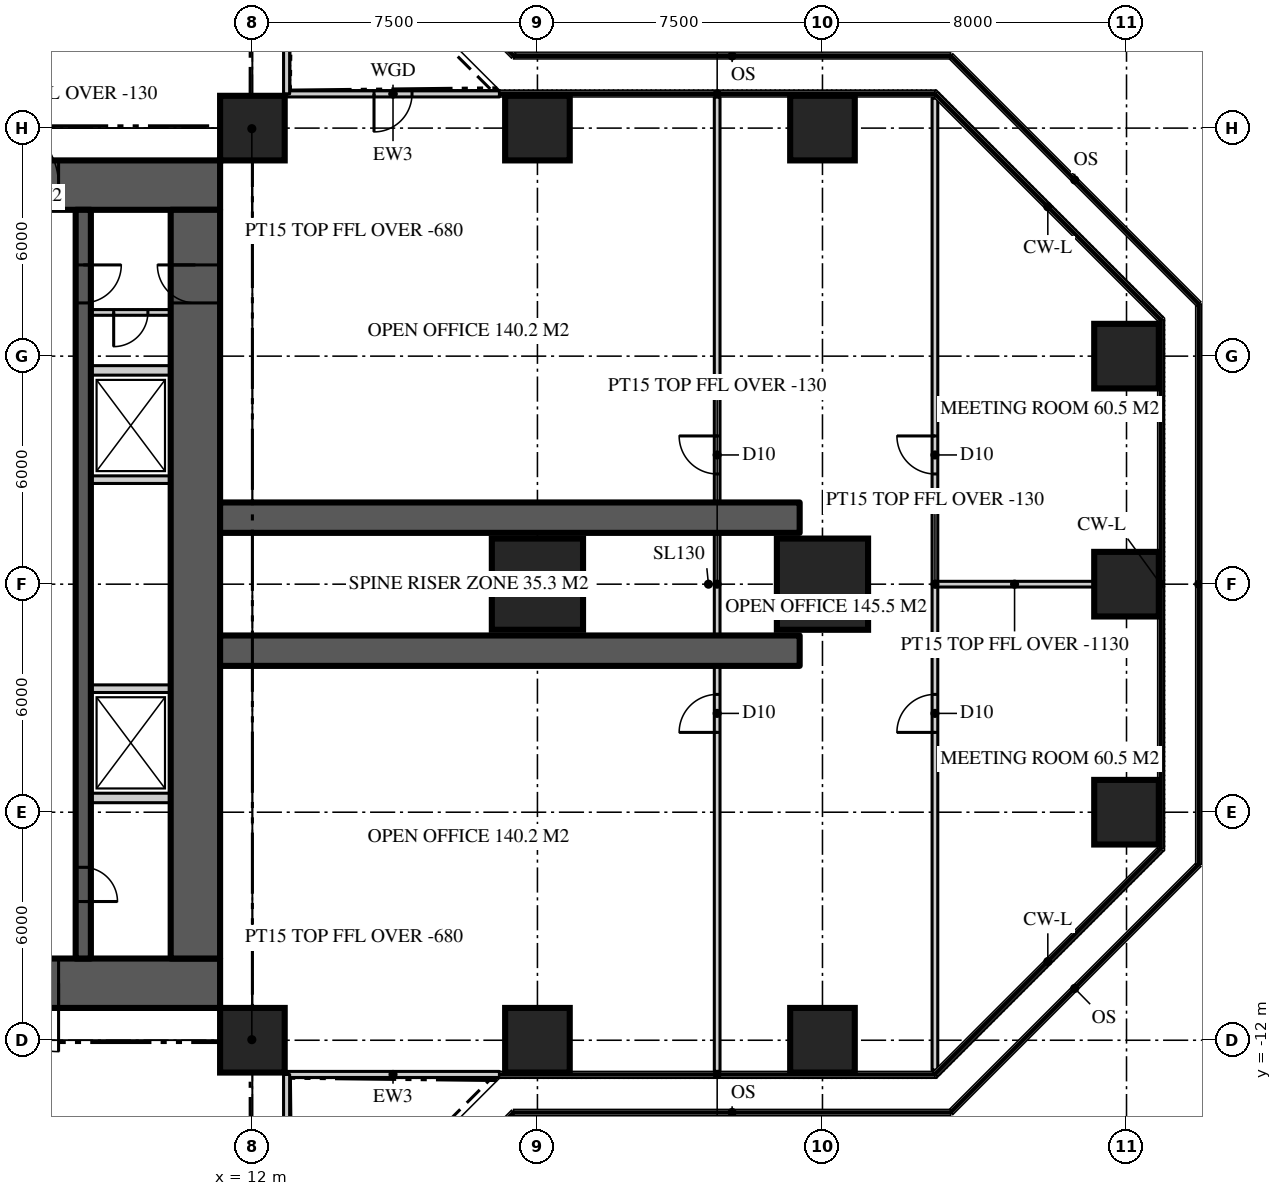
"""IFC4 building model, lengths in metres.
Left out: names, types, materials, properties, quantities, classifications, styles, units other than length and angle.
Written with IfcOpenShell. Run it as: python <this file> out.ifc"""

import sys

from ifc_helpers import new_model, si_unit, direction, frame, frame_2d, origin, origin_2d, place, context, subcontext, project, spatial, rectangle, extrude, element, fill, save


model = new_model("IFC4")
c1 = context("Model", 3, precision=1e-05, world=origin(), true_north=direction((0.0, 1.0)))
c2 = subcontext(c1, "Body", "Model", "MODEL_VIEW")
j1 = project(units=[si_unit("LENGTHUNIT", "METRE"), si_unit("PLANEANGLEUNIT", "RADIAN")], contexts=[c1])
p1 = place(None, origin())
s1 = spatial("IfcSite", under=j1, at=p1, CompositionType="ELEMENT")
p2 = place(p1, origin())
s2 = spatial("IfcBuilding", under=s1, at=p2, CompositionType="ELEMENT")
p3 = place(p2, frame((0.0, 0.0, 66.9)))
s3 = spatial("IfcBuildingStorey", under=s2, at=p3, CompositionType="ELEMENT", Elevation=66.9)
p4 = place(p3, frame((-11.15, 10.5, 0.0), z_axis=(0.0, 0.0, 1.0), x_axis=(1.0, 0.0, 0.0)))
e1 = element("IfcWall", 1, at=p4, inside=s3, PredefinedType="SHEAR", context=c2, shape_type="SweptSolid", body=[
    extrude(rectangle(XDim=22.3, YDim=1.3, at=frame_2d((11.15, 0.0))), origin(), (0.0, 0.0, 1.0), 3.9),
])
p5 = place(p4, frame((4.25, 0.0, 0.0)))
e2 = element("IfcOpeningElement", 2, at=p5, cuts=e1, PredefinedType="OPENING", context=c2, shape_type="SweptSolid", body=[
    extrude(rectangle(XDim=1.8, YDim=2.2, at=frame_2d((0.9, 1.1))), frame((0.0, 0.66, 0.0), z_axis=(0.0, -1.0, 0.0), x_axis=(1.0, 0.0, 0.0)), (0.0, 0.0, 1.0), 1.32),
])
p6 = place(p4, frame((16.25, 0.0, 0.0)))
e3 = element("IfcOpeningElement", 3, at=p6, cuts=e1, PredefinedType="OPENING", context=c2, shape_type="SweptSolid", body=[
    extrude(rectangle(XDim=1.8, YDim=2.2, at=frame_2d((0.9, 1.1))), frame((0.0, 0.66, 0.0), z_axis=(0.0, -1.0, 0.0), x_axis=(1.0, 0.0, 0.0)), (0.0, 0.0, 1.0), 1.32),
])
p7 = place(p3, frame((11.15, -10.5, 0.0), z_axis=(0.0, 0.0, 1.0), x_axis=(-1.0, 0.0, 0.0)))
e4 = element("IfcWall", 4, at=p7, inside=s3, PredefinedType="SHEAR", context=c2, shape_type="SweptSolid", body=[
    extrude(rectangle(XDim=22.3, YDim=1.3, at=frame_2d((11.15, 0.0))), origin(), (0.0, 0.0, 1.0), 3.9),
])
p8 = place(p7, frame((16.25, 0.0, 0.0)))
e5 = element("IfcOpeningElement", 5, at=p8, cuts=e4, PredefinedType="OPENING", context=c2, shape_type="SweptSolid", body=[
    extrude(rectangle(XDim=1.8, YDim=2.2, at=frame_2d((0.9, 1.1))), frame((0.0, 0.66, 0.0), z_axis=(0.0, -1.0, 0.0), x_axis=(1.0, 0.0, 0.0)), (0.0, 0.0, 1.0), 1.32),
])
p9 = place(p7, frame((4.25, 0.0, 0.0)))
e6 = element("IfcOpeningElement", 6, at=p9, cuts=e4, PredefinedType="OPENING", context=c2, shape_type="SweptSolid", body=[
    extrude(rectangle(XDim=1.8, YDim=2.2, at=frame_2d((0.9, 1.1))), frame((0.0, 0.66, 0.0), z_axis=(0.0, -1.0, 0.0), x_axis=(1.0, 0.0, 0.0)), (0.0, 0.0, 1.0), 1.32),
])
p10 = place(p3, frame((10.5, -9.85, 0.0), z_axis=(0.0, 0.0, 1.0), x_axis=(0.0, 1.0, 0.0)))
e7 = element("IfcWall", 7, at=p10, inside=s3, PredefinedType="SHEAR", context=c2, shape_type="SweptSolid", body=[
    extrude(rectangle(XDim=19.7, YDim=1.3, at=frame_2d((9.85, 0.0))), origin(), (0.0, 0.0, 1.0), 3.9),
])
p11 = place(p10, frame((17.25, 0.0, 0.0)))
e8 = element("IfcOpeningElement", 8, at=p11, cuts=e7, PredefinedType="OPENING", context=c2, shape_type="SweptSolid", body=[
    extrude(rectangle(XDim=1.0, YDim=2.2, at=frame_2d((0.5, 1.1))), frame((0.0, 0.66, 0.0), z_axis=(0.0, -1.0, 0.0), x_axis=(1.0, 0.0, 0.0)), (0.0, 0.0, 1.0), 1.32),
])
for number, where, z_axis, x_axis in (
    (9, (11.15, -1.75, 0.0), (0.0, 0.0, 1.0), (1.0, 0.0, 0.0)),
    (10, (11.15, 1.75, 0.0), (0.0, 0.0, 1.0), (1.0, 0.0, 0.0)),
):
    element("IfcWall", number, at=place(p3, frame(where, z_axis=z_axis, x_axis=x_axis)), inside=s3, PredefinedType="SHEAR", context=c2, shape_type="SweptSolid", body=[
        extrude(rectangle(XDim=15.25, YDim=0.8, at=frame_2d((7.625, 0.0))), origin(), (0.0, 0.0, 1.0), 3.9),
    ])
for number, where, z_axis, x_axis in (
    (11, (12.0, -12.0, 0.0), (0.0, 0.0, 1.0), (1.0, 0.0, 0.0)),
    (12, (19.5, -12.0, 0.0), (0.0, 0.0, 1.0), (1.0, 0.0, 0.0)),
    (13, (27.0, -12.0, 0.0), (0.0, 0.0, 1.0), (1.0, 0.0, 0.0)),
    (14, (35.0, -6.0, 0.0), (0.0, 0.0, 1.0), (1.0, 0.0, 0.0)),
):
    element("IfcColumn", number, at=place(p3, frame(where, z_axis=z_axis, x_axis=x_axis)), inside=s3, PredefinedType="COLUMN", context=c2, shape_type="SweptSolid", body=[
        extrude(rectangle(XDim=1.7, YDim=1.7, at=origin_2d()), origin(), (0.0, 0.0, 1.0), 3.9),
    ])
for number, where, z_axis, x_axis in (
    (15, (19.5, 0.0, 0.0), (0.0, 0.0, 1.0), (1.0, 0.0, 0.0)),
    (16, (27.0, 0.0, 0.0), (0.0, 0.0, 1.0), (1.0, 0.0, 0.0)),
):
    element("IfcColumn", number, at=place(p3, frame(where, z_axis=z_axis, x_axis=x_axis)), inside=s3, PredefinedType="COLUMN", context=c2, shape_type="SweptSolid", body=[
        extrude(rectangle(XDim=2.4, YDim=2.4, at=origin_2d()), origin(), (0.0, 0.0, 1.0), 3.9),
    ])
for number, where, z_axis, x_axis in (
    (17, (35.0, 0.0, 0.0), (0.0, 0.0, 1.0), (1.0, 0.0, 0.0)),
    (18, (35.0, 6.0, 0.0), (0.0, 0.0, 1.0), (1.0, 0.0, 0.0)),
    (19, (12.0, 12.0, 0.0), (0.0, 0.0, 1.0), (1.0, 0.0, 0.0)),
    (20, (19.5, 12.0, 0.0), (0.0, 0.0, 1.0), (1.0, 0.0, 0.0)),
    (21, (27.0, 12.0, 0.0), (0.0, 0.0, 1.0), (1.0, 0.0, 0.0)),
):
    element("IfcColumn", number, at=place(p3, frame(where, z_axis=z_axis, x_axis=x_axis)), inside=s3, PredefinedType="COLUMN", context=c2, shape_type="SweptSolid", body=[
        extrude(rectangle(XDim=1.7, YDim=1.7, at=origin_2d()), origin(), (0.0, 0.0, 1.0), 3.9),
    ])
p12 = place(p3, frame((12.9, -12.9, 0.0), z_axis=(0.0, 0.0, 1.0), x_axis=(1.0, 0.0, 0.0)))
e22 = element("IfcWall", 22, at=p12, inside=s3, PredefinedType="SOLIDWALL", context=c2, shape_type="SweptSolid", body=[
    extrude(rectangle(XDim=5.6, YDim=0.16, at=frame_2d((2.8, 0.0))), origin(), (0.0, 0.0, 1.0), 3.77),
])
p13 = place(p3, frame((18.5, 12.9, 0.0), z_axis=(0.0, 0.0, 1.0), x_axis=(-1.0, 0.0, 0.0)))
e23 = element("IfcWall", 23, at=p13, inside=s3, PredefinedType="SOLIDWALL", context=c2, shape_type="SweptSolid", body=[
    extrude(rectangle(XDim=5.6, YDim=0.16, at=frame_2d((2.8, 0.0))), origin(), (0.0, 0.0, 1.0), 3.77),
])
p14 = place(p13, frame((2.3, 0.0, 0.0)))
e24 = element("IfcOpeningElement", 24, at=p14, cuts=e23, PredefinedType="OPENING", context=c2, shape_type="SweptSolid", body=[
    extrude(rectangle(XDim=1.0, YDim=2.2, at=frame_2d((0.5, 1.1))), frame((0.0, 0.09, 0.0), z_axis=(0.0, -1.0, 0.0), x_axis=(1.0, 0.0, 0.0)), (0.0, 0.0, 1.0), 0.18),
])
p15 = place(p3, frame((12.9, 12.9, 0.0), z_axis=(0.0, 0.0, 1.0), x_axis=(0.0, 1.0, 0.0)))
e25 = element("IfcWall", 25, at=p15, inside=s3, PredefinedType="SOLIDWALL", context=c2, shape_type="SweptSolid", body=[
    extrude(rectangle(XDim=5.6, YDim=0.16, at=frame_2d((2.8, 0.0))), origin(), (0.0, 0.0, 1.0), 3.77),
])
p16 = place(p3, frame((12.9, -18.5, 0.0), z_axis=(0.0, 0.0, 1.0), x_axis=(0.0, 1.0, 0.0)))
e26 = element("IfcWall", 26, at=p16, inside=s3, PredefinedType="SOLIDWALL", context=c2, shape_type="SweptSolid", body=[
    extrude(rectangle(XDim=5.6, YDim=0.16, at=frame_2d((2.8, 0.0))), origin(), (0.0, 0.0, 1.0), 3.77),
])
p17 = place(p16, frame((2.3, 0.0, 0.0)))
e27 = element("IfcOpeningElement", 27, at=p17, cuts=e26, PredefinedType="OPENING", context=c2, shape_type="SweptSolid", body=[
    extrude(rectangle(XDim=1.0, YDim=2.2, at=frame_2d((0.5, 1.1))), frame((0.0, 0.09, 0.0), z_axis=(0.0, -1.0, 0.0), x_axis=(1.0, 0.0, 0.0)), (0.0, 0.0, 1.0), 0.18),
])
p18 = place(p3, frame((7.55, 9.85, 0.0), z_axis=(0.0, 0.0, 1.0), x_axis=(0.0, -1.0, 0.0)))
e28 = element("IfcWall", 28, at=p18, inside=s3, PredefinedType="SHEAR", context=c2, shape_type="SweptSolid", body=[
    extrude(rectangle(XDim=19.7, YDim=0.4, at=frame_2d((9.85, 0.0))), origin(), (0.0, 0.0, 1.0), 3.9),
])
p19 = place(p18, frame((1.45, 0.0, 0.0)))
e29 = element("IfcOpeningElement", 29, at=p19, cuts=e28, PredefinedType="OPENING", context=c2, shape_type="SweptSolid", body=[
    extrude(rectangle(XDim=1.0, YDim=2.2, at=frame_2d((0.5, 1.1))), frame((0.0, 0.21, 0.0), z_axis=(0.0, -1.0, 0.0), x_axis=(1.0, 0.0, 0.0)), (0.0, 0.0, 1.0), 0.42),
])
p20 = place(p18, frame((17.3, 0.0, 0.0)))
e30 = element("IfcOpeningElement", 30, at=p20, cuts=e28, PredefinedType="OPENING", context=c2, shape_type="SweptSolid", body=[
    extrude(rectangle(XDim=0.9, YDim=2.1, at=frame_2d((0.45, 1.05))), frame((0.0, 0.21, 0.0), z_axis=(0.0, -1.0, 0.0), x_axis=(1.0, 0.0, 0.0)), (0.0, 0.0, 1.0), 0.42),
])
for number, where, z_axis, x_axis in (
    (31, (7.75, 5.625, 0.0), (0.0, 0.0, 1.0), (1.0, 0.0, 0.0)),
    (32, (7.75, -5.625, 0.0), (0.0, 0.0, 1.0), (1.0, 0.0, 0.0)),
):
    element("IfcWall", number, at=place(p3, frame(where, z_axis=z_axis, x_axis=x_axis)), inside=s3, PredefinedType="SOLIDWALL", context=c2, shape_type="SweptSolid", body=[
        extrude(rectangle(XDim=2.1, YDim=0.25, at=frame_2d((1.05, 0.0))), origin(), (0.0, 0.0, 1.0), 3.7),
    ])
for number, where, z_axis, x_axis in (
    (33, (7.75, -2.75, 0.0), (0.0, 0.0, 1.0), (1.0, 0.0, 0.0)),
    (34, (7.75, 2.75, 0.0), (0.0, 0.0, 1.0), (1.0, 0.0, 0.0)),
):
    element("IfcWall", number, at=place(p3, frame(where, z_axis=z_axis, x_axis=x_axis)), inside=s3, PredefinedType="SOLIDWALL", context=c2, shape_type="SweptSolid", body=[
        extrude(rectangle(XDim=2.1, YDim=0.2, at=frame_2d((1.05, 0.0))), origin(), (0.0, 0.0, 1.0), 3.7),
    ])
p21 = place(p3, frame((24.229, -12.82, 0.0), z_axis=(0.0, 0.0, 1.0), x_axis=(0.0, 1.0, 0.0)))
e35 = element("IfcWall", 35, at=p21, inside=s3, PredefinedType="PARTITIONING", context=c2, shape_type="SweptSolid", body=[
    extrude(rectangle(XDim=25.64, YDim=0.15, at=frame_2d((12.82, 0.0))), origin(), (0.0, 0.0, 1.0), 3.77),
])
p22 = place(p21, frame((15.72, 0.0, 0.0)))
e36 = element("IfcOpeningElement", 36, at=p22, cuts=e35, PredefinedType="OPENING", context=c2, shape_type="SweptSolid", body=[
    extrude(rectangle(XDim=1.0, YDim=2.2, at=frame_2d((0.5, 1.1))), frame((0.0, 0.085, 0.0), z_axis=(0.0, -1.0, 0.0), x_axis=(1.0, 0.0, 0.0)), (0.0, 0.0, 1.0), 0.17),
])
p23 = place(p21, frame((8.92, 0.0, 0.0)))
e37 = element("IfcOpeningElement", 37, at=p23, cuts=e35, PredefinedType="OPENING", context=c2, shape_type="SweptSolid", body=[
    extrude(rectangle(XDim=1.0, YDim=2.2, at=frame_2d((0.5, 1.1))), frame((0.0, 0.085, 0.0), z_axis=(0.0, -1.0, 0.0), x_axis=(1.0, 0.0, 0.0)), (0.0, 0.0, 1.0), 0.17),
])
p24 = place(p3, frame((29.959, -12.786, 0.0), z_axis=(0.0, 0.0, 1.0), x_axis=(0.0, 1.0, 0.0)))
e38 = element("IfcWall", 38, at=p24, inside=s3, PredefinedType="PARTITIONING", context=c2, shape_type="SweptSolid", body=[
    extrude(rectangle(XDim=25.573, YDim=0.15, at=frame_2d((12.786, 0.0))), origin(), (0.0, 0.0, 1.0), 3.77),
])
p25 = place(p24, frame((15.687, 0.0, 0.0)))
e39 = element("IfcOpeningElement", 39, at=p25, cuts=e38, PredefinedType="OPENING", context=c2, shape_type="SweptSolid", body=[
    extrude(rectangle(XDim=1.0, YDim=2.2, at=frame_2d((0.5, 1.1))), frame((0.0, 0.085, 0.0), z_axis=(0.0, -1.0, 0.0), x_axis=(1.0, 0.0, 0.0)), (0.0, 0.0, 1.0), 0.17),
])
p26 = place(p24, frame((8.886, 0.0, 0.0)))
e40 = element("IfcOpeningElement", 40, at=p26, cuts=e38, PredefinedType="OPENING", context=c2, shape_type="SweptSolid", body=[
    extrude(rectangle(XDim=1.0, YDim=2.2, at=frame_2d((0.5, 1.1))), frame((0.0, 0.085, 0.0), z_axis=(0.0, -1.0, 0.0), x_axis=(1.0, 0.0, 0.0)), (0.0, 0.0, 1.0), 0.17),
])
p27 = place(p3, frame((29.959, 0.0, 0.0), z_axis=(0.0, 0.0, 1.0), x_axis=(1.0, 0.0, 0.0)))
e41 = element("IfcWall", 41, at=p27, inside=s3, PredefinedType="PARTITIONING", context=c2, shape_type="SweptSolid", body=[
    extrude(rectangle(XDim=4.191, YDim=0.15, at=frame_2d((2.095, 0.0))), origin(), (0.0, 0.0, 1.0), 2.77),
])
for number, where, z_axis, x_axis in (
    (42, (11.15, 11.15, 0.0), (0.0, 0.0, 1.0), (0.707, 0.707, 0.0)),
    (43, (11.15, -11.15, 0.0), (0.0, 0.0, 1.0), (0.707, -0.707, 0.0)),
):
    element("IfcWall", number, at=place(p3, frame(where, z_axis=z_axis, x_axis=x_axis)), inside=s3, PredefinedType="PARTITIONING", context=c2, shape_type="SweptSolid", body=[
        extrude(rectangle(XDim=2.362, YDim=0.15, at=frame_2d((1.181, 0.0))), origin(), (0.0, 0.0, 1.0), 3.22),
    ])
p28 = place(p3, frame((9.85, 7.15, 0.0), z_axis=(0.0, 0.0, 1.0), x_axis=(-1.0, 0.0, 0.0)))
e44 = element("IfcWall", 44, at=p28, inside=s3, PredefinedType="SOLIDWALL", context=c2, shape_type="SweptSolid", body=[
    extrude(rectangle(XDim=2.1, YDim=0.15, at=frame_2d((1.05, 0.0))), origin(), (0.0, 0.0, 1.0), 3.77),
])
p29 = place(p28, frame((0.6, 0.0, 0.0)))
e45 = element("IfcOpeningElement", 45, at=p29, cuts=e44, PredefinedType="OPENING", context=c2, shape_type="SweptSolid", body=[
    extrude(rectangle(XDim=0.9, YDim=2.1, at=frame_2d((0.45, 1.05))), frame((0.0, 0.085, 0.0), z_axis=(0.0, -1.0, 0.0), x_axis=(1.0, 0.0, 0.0)), (0.0, 0.0, 1.0), 0.17),
])
p30 = place(p14, origin())
e46 = element("IfcDoor", 46, at=p30, inside=s3, OperationType="SINGLE_SWING_RIGHT", PredefinedType="DOOR", context=c2, shape_type="SweptSolid", body=[
    extrude(rectangle(XDim=1.0, YDim=2.2, at=frame_2d((0.5, 1.1))), frame((0.0, 0.025, 0.0), z_axis=(0.0, -1.0, 0.0), x_axis=(1.0, 0.0, 0.0)), (0.0, 0.0, 1.0), 0.05),
])
fill(e24, e46)
p31 = place(p6, origin())
e47 = element("IfcDoor", 47, at=p31, inside=s3, OperationType="DOUBLE_DOOR_DOUBLE_SWING", PredefinedType="DOOR", context=c2, shape_type="SweptSolid", body=[
    extrude(rectangle(XDim=1.8, YDim=2.2, at=frame_2d((0.9, 1.1))), frame((0.0, 0.025, 0.0), z_axis=(0.0, -1.0, 0.0), x_axis=(1.0, 0.0, 0.0)), (0.0, 0.0, 1.0), 0.05),
])
fill(e3, e47)
p32 = place(p9, origin())
e48 = element("IfcDoor", 48, at=p32, inside=s3, OperationType="DOUBLE_DOOR_DOUBLE_SWING", PredefinedType="DOOR", context=c2, shape_type="SweptSolid", body=[
    extrude(rectangle(XDim=1.8, YDim=2.2, at=frame_2d((0.9, 1.1))), frame((0.0, 0.025, 0.0), z_axis=(0.0, -1.0, 0.0), x_axis=(1.0, 0.0, 0.0)), (0.0, 0.0, 1.0), 0.05),
])
fill(e6, e48)
p33 = place(p19, origin())
e49 = element("IfcDoor", 49, at=p33, inside=s3, OperationType="SINGLE_SWING_LEFT", PredefinedType="DOOR", context=c2, shape_type="SweptSolid", body=[
    extrude(rectangle(XDim=1.0, YDim=2.2, at=frame_2d((0.5, 1.1))), frame((0.0, 0.025, 0.0), z_axis=(0.0, -1.0, 0.0), x_axis=(1.0, 0.0, 0.0)), (0.0, 0.0, 1.0), 0.05),
])
fill(e29, e49)
p34 = place(p11, origin())
e50 = element("IfcDoor", 50, at=p34, inside=s3, OperationType="SINGLE_SWING_RIGHT", PredefinedType="DOOR", context=c2, shape_type="SweptSolid", body=[
    extrude(rectangle(XDim=1.0, YDim=2.2, at=frame_2d((0.5, 1.1))), frame((0.0, 0.025, 0.0), z_axis=(0.0, -1.0, 0.0), x_axis=(1.0, 0.0, 0.0)), (0.0, 0.0, 1.0), 0.05),
])
fill(e8, e50)
p35 = place(p20, origin())
e51 = element("IfcDoor", 51, at=p35, inside=s3, OperationType="SINGLE_SWING_RIGHT", PredefinedType="DOOR", context=c2, shape_type="SweptSolid", body=[
    extrude(rectangle(XDim=0.9, YDim=2.1, at=frame_2d((0.45, 1.05))), frame((0.0, 0.025, 0.0), z_axis=(0.0, -1.0, 0.0), x_axis=(1.0, 0.0, 0.0)), (0.0, 0.0, 1.0), 0.05),
])
fill(e30, e51)
p36 = place(p22, origin())
e52 = element("IfcDoor", 52, at=p36, inside=s3, OperationType="SINGLE_SWING_RIGHT", PredefinedType="DOOR", context=c2, shape_type="SweptSolid", body=[
    extrude(rectangle(XDim=1.0, YDim=2.2, at=frame_2d((0.5, 1.1))), frame((0.0, 0.025, 0.0), z_axis=(0.0, -1.0, 0.0), x_axis=(1.0, 0.0, 0.0)), (0.0, 0.0, 1.0), 0.05),
])
fill(e36, e52)
p37 = place(p23, origin())
e53 = element("IfcDoor", 53, at=p37, inside=s3, OperationType="SINGLE_SWING_LEFT", PredefinedType="DOOR", context=c2, shape_type="SweptSolid", body=[
    extrude(rectangle(XDim=1.0, YDim=2.2, at=frame_2d((0.5, 1.1))), frame((0.0, 0.025, 0.0), z_axis=(0.0, -1.0, 0.0), x_axis=(1.0, 0.0, 0.0)), (0.0, 0.0, 1.0), 0.05),
])
fill(e37, e53)
p38 = place(p25, origin())
e54 = element("IfcDoor", 54, at=p38, inside=s3, OperationType="SINGLE_SWING_RIGHT", PredefinedType="DOOR", context=c2, shape_type="SweptSolid", body=[
    extrude(rectangle(XDim=1.0, YDim=2.2, at=frame_2d((0.5, 1.1))), frame((0.0, 0.025, 0.0), z_axis=(0.0, -1.0, 0.0), x_axis=(1.0, 0.0, 0.0)), (0.0, 0.0, 1.0), 0.05),
])
fill(e39, e54)
p39 = place(p26, origin())
e55 = element("IfcDoor", 55, at=p39, inside=s3, OperationType="SINGLE_SWING_LEFT", PredefinedType="DOOR", context=c2, shape_type="SweptSolid", body=[
    extrude(rectangle(XDim=1.0, YDim=2.2, at=frame_2d((0.5, 1.1))), frame((0.0, 0.025, 0.0), z_axis=(0.0, -1.0, 0.0), x_axis=(1.0, 0.0, 0.0)), (0.0, 0.0, 1.0), 0.05),
])
fill(e40, e55)
p40 = place(p29, origin())
e56 = element("IfcDoor", 56, at=p40, inside=s3, OperationType="SINGLE_SWING_RIGHT", PredefinedType="DOOR", context=c2, shape_type="SweptSolid", body=[
    extrude(rectangle(XDim=0.9, YDim=2.1, at=frame_2d((0.45, 1.05))), frame((0.0, 0.025, 0.0), z_axis=(0.0, -1.0, 0.0), x_axis=(1.0, 0.0, 0.0)), (0.0, 0.0, 1.0), 0.05),
])
fill(e45, e56)
save(model, sys.argv[1])
